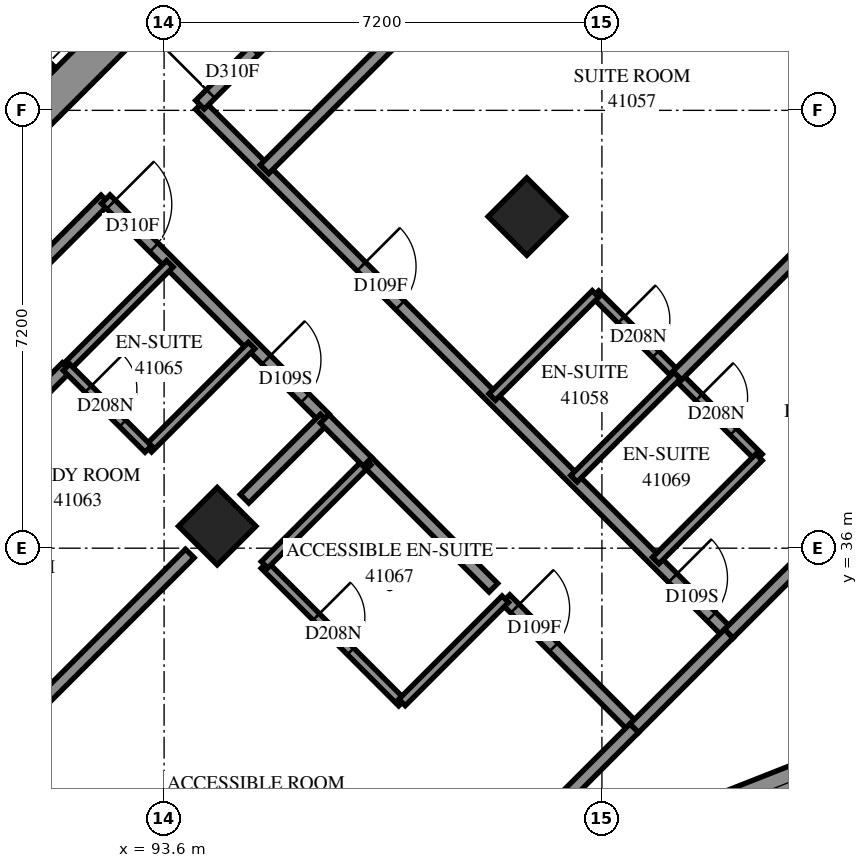
"""IFC4 building model, lengths in metres.
Left out: names, types, materials, properties, quantities, classifications, styles, units other than length and angle.
Written with IfcOpenShell. Run it as: python <this file> out.ifc"""

import sys

from ifc_helpers import new_model, si_unit, direction, frame, frame_2d, origin, origin_2d, place, context, subcontext, project, spatial, polyline, rectangle, outline, extrude, element, fill, save


model = new_model("IFC4")
c1 = context("Model", 3, precision=1e-05, world=origin(), true_north=direction((0.0, 1.0)))
c2 = subcontext(c1, "Body", "Model", "MODEL_VIEW")
j1 = project(units=[si_unit("LENGTHUNIT", "METRE"), si_unit("PLANEANGLEUNIT", "RADIAN")], contexts=[c1])
p1 = place(None, origin())
s1 = spatial("IfcSite", under=j1, at=p1, CompositionType="ELEMENT")
p2 = place(p1, origin())
s2 = spatial("IfcBuilding", under=s1, at=p2, CompositionType="ELEMENT")
p3 = place(p2, frame((0.0, 0.0, 152.4)))
s3 = spatial("IfcBuildingStorey", under=s2, at=p3, CompositionType="ELEMENT", Elevation=152.4)
for number, where, z_axis, x_axis in (
    (1, (99.565, 41.453, 0.0), (0.0, 0.0, 1.0), (0.707, -0.707, 0.0)),
    (2, (94.474, 36.362, 0.0), (0.0, 0.0, 1.0), (0.707, -0.707, 0.0)),
):
    element("IfcColumn", number, at=place(p3, frame(where, z_axis=z_axis, x_axis=x_axis)), inside=s3, PredefinedType="COLUMN", context=c2, shape_type="SweptSolid", body=[
        extrude(rectangle(XDim=0.9, YDim=0.9, at=origin_2d()), origin(), (0.0, 0.0, 1.0), 3.1),
    ])
p4 = place(p3, frame((87.049, 38.695, -0.3), z_axis=(0.0, 0.0, 1.0), x_axis=(0.7071067812, 0.7071067812, 0.0)))
e3 = element("IfcWall", 3, at=p4, inside=s3, PredefinedType="SHEAR", context=c2, shape_type="SweptSolid", body=[
    extrude(rectangle(XDim=14.4, YDim=0.6, at=frame_2d((7.2, 0.0))), origin(), (0.0, 0.0, 1.0), 2.7),
])
p5 = place(p4, frame((4.55, 0.0, 0.3)))
e4 = element("IfcOpeningElement", 4, at=p5, cuts=e3, PredefinedType="OPENING", context=c2, shape_type="SweptSolid", body=[
    extrude(rectangle(XDim=1.1, YDim=2.1, at=frame_2d((0.55, 1.05))), frame((0.0, 0.31, 0.0), z_axis=(0.0, -1.0, 0.0), x_axis=(1.0, 0.0, 0.0)), (0.0, 0.0, 1.0), 0.62),
])
p6 = place(p4, frame((11.35, 0.0, 0.3)))
e5 = element("IfcOpeningElement", 5, at=p6, cuts=e3, PredefinedType="OPENING", context=c2, shape_type="SweptSolid", body=[
    extrude(rectangle(XDim=1.1, YDim=2.1, at=frame_2d((0.55, 1.05))), frame((0.0, 0.31, 0.0), z_axis=(0.0, -1.0, 0.0), x_axis=(1.0, 0.0, 0.0)), (0.0, 0.0, 1.0), 0.62),
])
p7 = place(p3, frame((81.534, 53.969, 0.0), z_axis=(0.0, 0.0, 1.0), x_axis=(0.707103309, -0.7071102534, 0.0)))
e6 = element("IfcWall", 6, at=p7, inside=s3, PredefinedType="SOLIDWALL", context=c2, shape_type="SweptSolid", body=[
    extrude(rectangle(XDim=14.4, YDim=0.3, at=frame_2d((7.2, 0.0))), origin(), (0.0, 0.0, 1.0), 3.1),
])
p8 = place(p7, frame((1.25, 0.0, 0.0)))
e7 = element("IfcOpeningElement", 7, at=p8, cuts=e6, PredefinedType="OPENING", context=c2, shape_type="SweptSolid", body=[
    extrude(rectangle(XDim=1.1, YDim=2.1, at=frame_2d((0.55, 1.05))), frame((0.0, 0.16, 0.0), z_axis=(0.0, -1.0, 0.0), x_axis=(1.0, 0.0, 0.0)), (0.0, 0.0, 1.0), 0.32),
])
p9 = place(p7, frame((4.85, 0.0, 0.0)))
e8 = element("IfcOpeningElement", 8, at=p9, cuts=e6, PredefinedType="OPENING", context=c2, shape_type="SweptSolid", body=[
    extrude(rectangle(XDim=1.1, YDim=2.1, at=frame_2d((0.55, 1.05))), frame((0.0, 0.16, 0.0), z_axis=(0.0, -1.0, 0.0), x_axis=(1.0, 0.0, 0.0)), (0.0, 0.0, 1.0), 0.32),
])
p10 = place(p7, frame((8.45, 0.0, 0.0)))
e9 = element("IfcOpeningElement", 9, at=p10, cuts=e6, PredefinedType="OPENING", context=c2, shape_type="SweptSolid", body=[
    extrude(rectangle(XDim=1.1, YDim=2.1, at=frame_2d((0.55, 1.05))), frame((0.0, 0.16, 0.0), z_axis=(0.0, -1.0, 0.0), x_axis=(1.0, 0.0, 0.0)), (0.0, 0.0, 1.0), 0.32),
])
p11 = place(p7, frame((12.05, 0.0, 0.0)))
e10 = element("IfcOpeningElement", 10, at=p11, cuts=e6, PredefinedType="OPENING", context=c2, shape_type="SweptSolid", body=[
    extrude(rectangle(XDim=1.1, YDim=2.1, at=frame_2d((0.55, 1.05))), frame((0.0, 0.16, 0.0), z_axis=(0.0, -1.0, 0.0), x_axis=(1.0, 0.0, 0.0)), (0.0, 0.0, 1.0), 0.32),
])
p12 = place(p3, frame((100.839, 30.95, 0.0), z_axis=(0.0, 0.0, 1.0), x_axis=(0.9303343627, 0.3667123852, 0.0)))
e11 = element("IfcWall", 11, at=p12, inside=s3, PredefinedType="SOLIDWALL", context=c2, shape_type="SweptSolid", body=[
    extrude(outline(polyline([(0.109, -0.25), (5.629, -0.25), (5.402, 0.25), (-0.109, 0.25), (0.109, -0.25)])), origin(), (0.0, 0.0, 1.0), 3.1),
])
p13 = place(p12, frame((0.614, 0.0, 0.45)))
e12 = element("IfcOpeningElement", 12, at=p13, cuts=e11, PredefinedType="OPENING", context=c2, shape_type="SweptSolid", body=[
    extrude(rectangle(XDim=2.8, YDim=2.5, at=frame_2d((1.4, 1.25))), frame((0.0, 0.26, 0.0), z_axis=(0.0, -1.0, 0.0), x_axis=(1.0, 0.0, 0.0)), (0.0, 0.0, 1.0), 0.52),
])
p14 = place(p3, frame((94.189, 43.287, 0.0), z_axis=(0.0, 0.0, 1.0), x_axis=(0.7071067812, -0.7071067812, 0.0)))
e13 = element("IfcWall", 13, at=p14, inside=s3, PredefinedType="PARTITIONING", context=c2, shape_type="SweptSolid", body=[
    extrude(rectangle(XDim=12.298, YDim=0.2, at=frame_2d((6.149, 0.0))), origin(), (0.0, 0.0, 1.0), 3.1),
])
p15 = place(p14, frame((3.755, 0.0, 0.0)))
e14 = element("IfcOpeningElement", 14, at=p15, cuts=e13, PredefinedType="OPENING", context=c2, shape_type="SweptSolid", body=[
    extrude(rectangle(XDim=0.9, YDim=2.1, at=frame_2d((0.45, 1.05))), frame((0.0, 0.11, 0.0), z_axis=(0.0, -1.0, 0.0), x_axis=(1.0, 0.0, 0.0)), (0.0, 0.0, 1.0), 0.22),
])
p16 = place(p14, frame((10.998, 0.0, 0.0)))
e15 = element("IfcOpeningElement", 15, at=p16, cuts=e13, PredefinedType="OPENING", context=c2, shape_type="SweptSolid", body=[
    extrude(rectangle(XDim=0.9, YDim=2.1, at=frame_2d((0.45, 1.05))), frame((0.0, 0.11, 0.0), z_axis=(0.0, -1.0, 0.0), x_axis=(1.0, 0.0, 0.0)), (0.0, 0.0, 1.0), 0.22),
])
p17 = place(p3, frame((95.25, 42.232, 0.0), z_axis=(0.0, 0.0, 1.0), x_axis=(0.7071114163, 0.707102146, 0.0)))
e16 = element("IfcWall", 16, at=p17, inside=s3, PredefinedType="PARTITIONING", context=c2, shape_type="SweptSolid", body=[
    extrude(rectangle(XDim=10.787, YDim=0.2, at=frame_2d((5.394, 0.0))), origin(), (0.0, 0.0, 1.0), 3.1),
])
p18 = place(p3, frame((94.19, 43.292, 0.0), z_axis=(0.0, 0.0, 1.0), x_axis=(0.7071067812, 0.7071067812, 0.0)))
e17 = element("IfcWall", 17, at=p18, inside=s3, PredefinedType="PARTITIONING", context=c2, shape_type="SweptSolid", body=[
    extrude(rectangle(XDim=8.2, YDim=0.2, at=frame_2d((4.1, 0.0))), origin(), (0.0, 0.0, 1.0), 3.1),
])
p19 = place(p18, frame((0.251, 0.0, 0.0)))
e18 = element("IfcOpeningElement", 18, at=p19, cuts=e17, PredefinedType="OPENING", context=c2, shape_type="SweptSolid", body=[
    extrude(rectangle(XDim=1.0, YDim=2.1, at=frame_2d((0.5, 1.05))), frame((0.0, 0.11, 0.0), z_axis=(0.0, -1.0, 0.0), x_axis=(1.0, 0.0, 0.0)), (0.0, 0.0, 1.0), 0.22),
])
p20 = place(p3, frame((86.836, 35.938, 0.0), z_axis=(0.0, 0.0, 1.0), x_axis=(0.7071067812, 0.7071067812, 0.0)))
e19 = element("IfcWall", 19, at=p20, inside=s3, PredefinedType="PARTITIONING", context=c2, shape_type="SweptSolid", body=[
    extrude(rectangle(XDim=8.2, YDim=0.2, at=frame_2d((4.1, 0.0))), origin(), (0.0, 0.0, 1.0), 3.1),
])
p21 = place(p3, frame((86.33, 33.311, 0.0), z_axis=(0.0, 0.0, 1.0), x_axis=(0.707100543, 0.7071130194, 0.0)))
e20 = element("IfcWall", 20, at=p21, inside=s3, PredefinedType="PARTITIONING", context=c2, shape_type="SweptSolid", body=[
    extrude(rectangle(XDim=8.015, YDim=0.2, at=frame_2d((4.008, 0.0))), origin(), (0.0, 0.0, 1.0), 3.1),
])
p22 = place(p3, frame((89.831, 31.721, 0.0), z_axis=(0.0, 0.0, 1.0), x_axis=(0.7071067812, 0.7071067812, 0.0)))
e21 = element("IfcWall", 21, at=p22, inside=s3, PredefinedType="PARTITIONING", context=c2, shape_type="SweptSolid", body=[
    extrude(rectangle(XDim=5.928, YDim=0.2, at=frame_2d((2.964, 0.0))), origin(), (0.0, 0.0, 1.0), 3.1),
])
p23 = place(p3, frame((92.639, 41.739, 0.0), z_axis=(0.0, 0.0, 1.0), x_axis=(0.7071067812, -0.7071067812, 0.0)))
e22 = element("IfcWall", 22, at=p23, inside=s3, PredefinedType="PARTITIONING", context=c2, shape_type="SweptSolid", body=[
    extrude(rectangle(XDim=5.1, YDim=0.2, at=frame_2d((2.55, 0.0))), origin(), (0.0, 0.0, 1.0), 3.1),
])
p24 = place(p23, frame((0.123, 0.0, 0.0)))
e23 = element("IfcOpeningElement", 23, at=p24, cuts=e22, PredefinedType="OPENING", context=c2, shape_type="SweptSolid", body=[
    extrude(rectangle(XDim=1.0, YDim=2.1, at=frame_2d((0.5, 1.05))), frame((0.0, 0.11, 0.0), z_axis=(0.0, -1.0, 0.0), x_axis=(1.0, 0.0, 0.0)), (0.0, 0.0, 1.0), 0.22),
])
p25 = place(p23, frame((3.734, 0.0, 0.0)))
e24 = element("IfcOpeningElement", 24, at=p25, cuts=e22, PredefinedType="OPENING", context=c2, shape_type="SweptSolid", body=[
    extrude(rectangle(XDim=0.9, YDim=2.1, at=frame_2d((0.45, 1.05))), frame((0.0, 0.11, 0.0), z_axis=(0.0, -1.0, 0.0), x_axis=(1.0, 0.0, 0.0)), (0.0, 0.0, 1.0), 0.22),
])
p26 = place(p3, frame((100.694, 40.178, 0.0), z_axis=(0.0, 0.0, 1.0), x_axis=(0.7076329021, -0.7065802685, 0.0)))
e25 = element("IfcWall", 25, at=p26, inside=s3, PredefinedType="PARTITIONING", context=c2, shape_type="SweptSolid", body=[
    extrude(rectangle(XDim=3.8, YDim=0.15, at=frame_2d((1.9, 0.0))), origin(), (0.0, 0.0, 1.0), 3.1),
])
p27 = place(p26, frame((0.598, 0.0, 0.0)))
e26 = element("IfcOpeningElement", 26, at=p27, cuts=e25, PredefinedType="OPENING", context=c2, shape_type="SweptSolid", body=[
    extrude(rectangle(XDim=0.8, YDim=2.1, at=frame_2d((0.4, 1.05))), frame((0.0, 0.085, 0.0), z_axis=(0.0, -1.0, 0.0), x_axis=(1.0, 0.0, 0.0)), (0.0, 0.0, 1.0), 0.17),
])
p28 = place(p26, frame((2.405, 0.0, 0.0)))
e27 = element("IfcOpeningElement", 27, at=p28, cuts=e25, PredefinedType="OPENING", context=c2, shape_type="SweptSolid", body=[
    extrude(rectangle(XDim=0.8, YDim=2.1, at=frame_2d((0.4, 1.05))), frame((0.0, 0.085, 0.0), z_axis=(0.0, -1.0, 0.0), x_axis=(1.0, 0.0, 0.0)), (0.0, 0.0, 1.0), 0.17),
])
p29 = place(p3, frame((95.249, 35.723, 0.0), z_axis=(0.0, 0.0, 1.0), x_axis=(0.7067942478, -0.7074191764, 0.0)))
e28 = element("IfcWall", 28, at=p29, inside=s3, PredefinedType="PARTITIONING", context=c2, shape_type="SweptSolid", body=[
    extrude(rectangle(XDim=3.2, YDim=0.15, at=frame_2d((1.6, 0.0))), origin(), (0.0, 0.0, 1.0), 3.1),
])
p30 = place(p29, frame((1.206, 0.0, 0.0)))
e29 = element("IfcOpeningElement", 29, at=p30, cuts=e28, PredefinedType="OPENING", context=c2, shape_type="SweptSolid", body=[
    extrude(rectangle(XDim=0.8, YDim=2.1, at=frame_2d((0.4, 1.05))), frame((0.0, 0.085, 0.0), z_axis=(0.0, -1.0, 0.0), x_axis=(1.0, 0.0, 0.0)), (0.0, 0.0, 1.0), 0.17),
])
p31 = place(p3, frame((102.04, 38.838, 0.0), z_axis=(0.0, 0.0, 1.0), x_axis=(0.7071067812, 0.7071067812, 0.0)))
e30 = element("IfcWall", 30, at=p31, inside=s3, PredefinedType="PARTITIONING", context=c2, shape_type="SweptSolid", body=[
    extrude(rectangle(XDim=3.199, YDim=0.2, at=frame_2d((1.599, 0.0))), origin(), (0.0, 0.0, 1.0), 3.1),
])
p32 = place(p3, frame((99.214, 35.162, 0.0), z_axis=(0.0, 0.0, 1.0), x_axis=(0.706773319, -0.7074400862, 0.0)))
e31 = element("IfcWall", 31, at=p32, inside=s3, PredefinedType="PARTITIONING", context=c2, shape_type="SweptSolid", body=[
    extrude(rectangle(XDim=2.999, YDim=0.2, at=frame_2d((1.5, 0.0))), origin(), (0.0, 0.0, 1.0), 3.1),
])
p33 = place(p32, frame((0.22, 0.0, 0.0)))
e32 = element("IfcOpeningElement", 32, at=p33, cuts=e31, PredefinedType="OPENING", context=c2, shape_type="SweptSolid", body=[
    extrude(rectangle(XDim=0.9, YDim=2.1, at=frame_2d((0.45, 1.05))), frame((0.0, 0.11, 0.0), z_axis=(0.0, -1.0, 0.0), x_axis=(1.0, 0.0, 0.0)), (0.0, 0.0, 1.0), 0.22),
])
p34 = place(p3, frame((96.945, 37.419, 0.0), z_axis=(0.0, 0.0, 1.0), x_axis=(0.7071067812, -0.7071067812, 0.0)))
e33 = element("IfcWall", 33, at=p34, inside=s3, PredefinedType="PARTITIONING", context=c2, shape_type="SweptSolid", body=[
    extrude(rectangle(XDim=2.927, YDim=0.2, at=frame_2d((1.464, 0.0))), origin(), (0.0, 0.0, 1.0), 3.1),
])
for number, where, z_axis, x_axis in (
    (34, (97.513, 33.463, 0.0), (0.0, 0.0, 1.0), (0.707, 0.707, 0.0)),
    (35, (93.341, 37.635, 0.0), (0.0, 0.0, 1.0), (0.707, 0.707, 0.0)),
    (36, (101.685, 35.797, 0.0), (0.0, 0.0, 1.0), (0.707, 0.707, 0.0)),
    (37, (91.997, 38.979, 0.0), (0.0, 0.0, 1.0), (0.707, 0.707, 0.0)),
):
    element("IfcWall", number, at=place(p3, frame(where, z_axis=z_axis, x_axis=x_axis)), inside=s3, PredefinedType="PARTITIONING", context=c2, shape_type="SweptSolid", body=[
        extrude(rectangle(XDim=2.401, YDim=0.15, at=frame_2d((1.201, 0.0))), origin(), (0.0, 0.0, 1.0), 3.1),
    ])
for number, where, z_axis, x_axis in (
    (38, (100.34, 37.142, 0.0), (0.0, 0.0, 1.0), (0.708, 0.707, 0.0)),
    (39, (98.996, 38.486, 0.0), (0.0, 0.0, 1.0), (0.708, 0.707, 0.0)),
):
    element("IfcWall", number, at=place(p3, frame(where, z_axis=z_axis, x_axis=x_axis)), inside=s3, PredefinedType="PARTITIONING", context=c2, shape_type="SweptSolid", body=[
        extrude(rectangle(XDim=2.4, YDim=0.15, at=frame_2d((1.2, 0.0))), origin(), (0.0, 0.0, 1.0), 3.1),
    ])
p35 = place(p3, frame((95.251, 35.727, 0.0), z_axis=(0.0, 0.0, 1.0), x_axis=(0.7071067812, 0.7071067812, 0.0)))
e40 = element("IfcWall", 40, at=p35, inside=s3, PredefinedType="PARTITIONING", context=c2, shape_type="SweptSolid", body=[
    extrude(rectangle(XDim=2.398, YDim=0.15, at=frame_2d((1.199, 0.0))), origin(), (0.0, 0.0, 1.0), 3.1),
])
p36 = place(p3, frame((101.331, 33.039, 0.0), z_axis=(0.0, 0.0, 1.0), x_axis=(0.7071067812, 0.7071067812, 0.0)))
e41 = element("IfcWall", 41, at=p36, inside=s3, PredefinedType="PARTITIONING", context=c2, shape_type="SweptSolid", body=[
    extrude(rectangle(XDim=2.2, YDim=0.2, at=frame_2d((1.1, 0.0))), origin(), (0.0, 0.0, 1.0), 2.6),
])
p37 = place(p3, frame((91.995, 38.975, 0.0), z_axis=(0.0, 0.0, 1.0), x_axis=(0.7071067812, -0.7071067812, 0.0)))
e42 = element("IfcWall", 42, at=p37, inside=s3, PredefinedType="PARTITIONING", context=c2, shape_type="SweptSolid", body=[
    extrude(rectangle(XDim=1.901, YDim=0.15, at=frame_2d((0.95, 0.0))), origin(), (0.0, 0.0, 1.0), 3.1),
])
p38 = place(p37, frame((0.506, 0.0, 0.0)))
e43 = element("IfcOpeningElement", 43, at=p38, cuts=e42, PredefinedType="OPENING", context=c2, shape_type="SweptSolid", body=[
    extrude(rectangle(XDim=0.8, YDim=2.1, at=frame_2d((0.4, 1.05))), frame((0.0, 0.085, 0.0), z_axis=(0.0, -1.0, 0.0), x_axis=(1.0, 0.0, 0.0)), (0.0, 0.0, 1.0), 0.17),
])
p39 = place(p3, frame((102.887, 34.595, 0.0), z_axis=(0.0, 0.0, 1.0), x_axis=(0.7071067812, 0.7071067812, 0.0)))
e44 = element("IfcWall", 44, at=p39, inside=s3, PredefinedType="PARTITIONING", context=c2, shape_type="SweptSolid", body=[
    extrude(rectangle(XDim=1.864, YDim=0.2, at=frame_2d((0.932, 0.0))), origin(), (0.0, 0.0, 1.0), 2.6),
])
p40 = place(p3, frame((94.923, 36.813, 0.0), z_axis=(0.0, 0.0, 1.0), x_axis=(0.7071067812, 0.7071067812, 0.0)))
e45 = element("IfcWall", 45, at=p40, inside=s3, PredefinedType="PARTITIONING", context=c2, shape_type="SweptSolid", body=[
    extrude(rectangle(XDim=1.864, YDim=0.2, at=frame_2d((0.932, 0.0))), origin(), (0.0, 0.0, 1.0), 3.1),
])
p41 = place(p3, frame((100.013, 31.721, 0.0), z_axis=(0.0, 0.0, 1.0), x_axis=(0.7071067812, 0.7071067812, 0.0)))
e46 = element("IfcWall", 46, at=p41, inside=s3, PredefinedType="PARTITIONING", context=c2, shape_type="SweptSolid", body=[
    extrude(rectangle(XDim=1.864, YDim=0.2, at=frame_2d((0.932, 0.0))), origin(), (0.0, 0.0, 1.0), 2.6),
])
p42 = place(p3, frame((96.24, 38.128, 0.0), z_axis=(0.0, 0.0, 1.0), x_axis=(0.7061059238, -0.7081062239, 0.0)))
e47 = element("IfcWall", 47, at=p42, inside=s3, PredefinedType="PARTITIONING", context=c2, shape_type="SweptSolid", body=[
    extrude(rectangle(XDim=1.0, YDim=0.2, at=frame_2d((0.5, 0.0))), origin(), (0.0, 0.0, 1.0), 3.1),
])
p43 = place(p13, origin())
e48 = element("IfcWindow", 48, at=p43, inside=s3, PartitioningType="SINGLE_PANEL", PredefinedType="WINDOW", context=c2, shape_type="SweptSolid", body=[
    extrude(rectangle(XDim=2.8, YDim=2.5, at=frame_2d((1.4, 1.25))), frame((0.0, 0.18, 0.0), z_axis=(0.0, -1.0, 0.0), x_axis=(1.0, 0.0, 0.0)), (0.0, 0.0, 1.0), 0.06),
])
fill(e12, e48)
p44 = place(p19, origin())
e49 = element("IfcDoor", 49, at=p44, inside=s3, OperationType="SINGLE_SWING_RIGHT", PredefinedType="DOOR", context=c2, shape_type="SweptSolid", body=[
    extrude(rectangle(XDim=1.0, YDim=2.1, at=frame_2d((0.5, 1.05))), frame((0.0, 0.025, 0.0), z_axis=(0.0, -1.0, 0.0), x_axis=(1.0, 0.0, 0.0)), (0.0, 0.0, 1.0), 0.05),
])
fill(e18, e49)
p45 = place(p15, origin())
e50 = element("IfcDoor", 50, at=p45, inside=s3, OperationType="SINGLE_SWING_RIGHT", PredefinedType="DOOR", context=c2, shape_type="SweptSolid", body=[
    extrude(rectangle(XDim=0.9, YDim=2.1, at=frame_2d((0.45, 1.05))), frame((0.0, 0.025, 0.0), z_axis=(0.0, -1.0, 0.0), x_axis=(1.0, 0.0, 0.0)), (0.0, 0.0, 1.0), 0.05),
])
fill(e14, e50)
p46 = place(p27, origin())
e51 = element("IfcDoor", 51, at=p46, inside=s3, OperationType="SINGLE_SWING_RIGHT", PredefinedType="DOOR", context=c2, shape_type="SweptSolid", body=[
    extrude(rectangle(XDim=0.8, YDim=2.1, at=frame_2d((0.4, 1.05))), frame((0.0, 0.025, 0.0), z_axis=(0.0, -1.0, 0.0), x_axis=(1.0, 0.0, 0.0)), (0.0, 0.0, 1.0), 0.05),
])
fill(e26, e51)
p47 = place(p24, origin())
e52 = element("IfcDoor", 52, at=p47, inside=s3, OperationType="SINGLE_SWING_RIGHT", PredefinedType="DOOR", context=c2, shape_type="SweptSolid", body=[
    extrude(rectangle(XDim=1.0, YDim=2.1, at=frame_2d((0.5, 1.05))), frame((0.0, 0.025, 0.0), z_axis=(0.0, -1.0, 0.0), x_axis=(1.0, 0.0, 0.0)), (0.0, 0.0, 1.0), 0.05),
])
fill(e23, e52)
p48 = place(p25, origin())
e53 = element("IfcDoor", 53, at=p48, inside=s3, OperationType="SINGLE_SWING_LEFT", PredefinedType="DOOR", context=c2, shape_type="SweptSolid", body=[
    extrude(rectangle(XDim=0.9, YDim=2.1, at=frame_2d((0.45, 1.05))), frame((0.0, 0.025, 0.0), z_axis=(0.0, -1.0, 0.0), x_axis=(1.0, 0.0, 0.0)), (0.0, 0.0, 1.0), 0.05),
])
fill(e24, e53)
p49 = place(p38, origin())
e54 = element("IfcDoor", 54, at=p49, inside=s3, OperationType="SINGLE_SWING_RIGHT", PredefinedType="DOOR", context=c2, shape_type="SweptSolid", body=[
    extrude(rectangle(XDim=0.8, YDim=2.1, at=frame_2d((0.4, 1.05))), frame((0.0, 0.025, 0.0), z_axis=(0.0, -1.0, 0.0), x_axis=(1.0, 0.0, 0.0)), (0.0, 0.0, 1.0), 0.05),
])
fill(e43, e54)
p50 = place(p33, origin())
e55 = element("IfcDoor", 55, at=p50, inside=s3, OperationType="SINGLE_SWING_RIGHT", PredefinedType="DOOR", context=c2, shape_type="SweptSolid", body=[
    extrude(rectangle(XDim=0.9, YDim=2.1, at=frame_2d((0.45, 1.05))), frame((0.0, 0.025, 0.0), z_axis=(0.0, -1.0, 0.0), x_axis=(1.0, 0.0, 0.0)), (0.0, 0.0, 1.0), 0.05),
])
fill(e32, e55)
p51 = place(p30, origin())
e56 = element("IfcDoor", 56, at=p51, inside=s3, OperationType="SINGLE_SWING_RIGHT", PredefinedType="DOOR", context=c2, shape_type="SweptSolid", body=[
    extrude(rectangle(XDim=0.8, YDim=2.1, at=frame_2d((0.4, 1.05))), frame((0.0, 0.025, 0.0), z_axis=(0.0, -1.0, 0.0), x_axis=(1.0, 0.0, 0.0)), (0.0, 0.0, 1.0), 0.05),
])
fill(e29, e56)
p52 = place(p16, origin())
e57 = element("IfcDoor", 57, at=p52, inside=s3, OperationType="SINGLE_SWING_RIGHT", PredefinedType="DOOR", context=c2, shape_type="SweptSolid", body=[
    extrude(rectangle(XDim=0.9, YDim=2.1, at=frame_2d((0.45, 1.05))), frame((0.0, 0.025, 0.0), z_axis=(0.0, -1.0, 0.0), x_axis=(1.0, 0.0, 0.0)), (0.0, 0.0, 1.0), 0.05),
])
fill(e15, e57)
p53 = place(p28, origin())
e58 = element("IfcDoor", 58, at=p53, inside=s3, OperationType="SINGLE_SWING_RIGHT", PredefinedType="DOOR", context=c2, shape_type="SweptSolid", body=[
    extrude(rectangle(XDim=0.8, YDim=2.1, at=frame_2d((0.4, 1.05))), frame((0.0, 0.025, 0.0), z_axis=(0.0, -1.0, 0.0), x_axis=(1.0, 0.0, 0.0)), (0.0, 0.0, 1.0), 0.05),
])
fill(e27, e58)
save(model, sys.argv[1])
